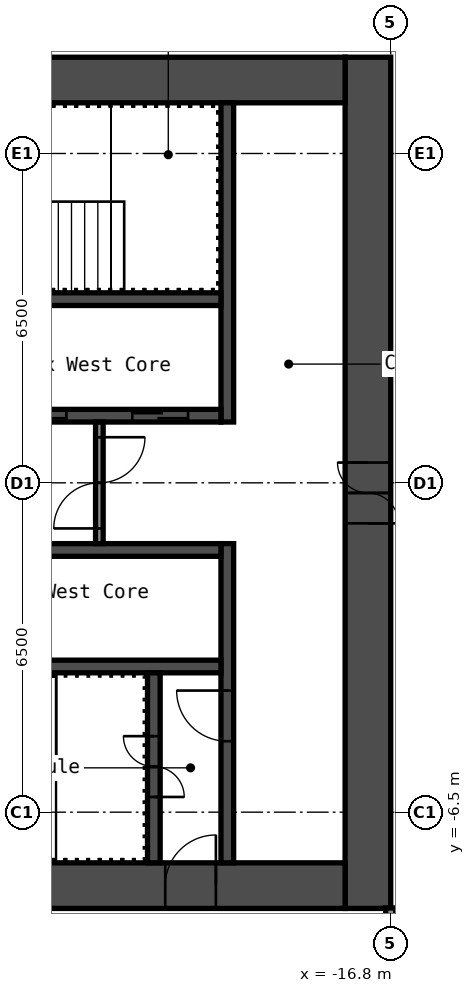
"""IFC4 building model, lengths in metres.
Left out: names, types, materials, properties, quantities, classifications, styles, units other than length and angle.
Written with IfcOpenShell. Run it as: python <this file> out.ifc"""

import sys

from ifc_helpers import new_model, si_unit, direction, frame, frame_2d, origin, place, context, subcontext, project, spatial, rectangle, extrude, element, fill, save


model = new_model("IFC4")
c1 = context("Model", 3, precision=1e-05, world=origin(), true_north=direction((0.0, 1.0)))
c2 = subcontext(c1, "Body", "Model", "MODEL_VIEW")
j1 = project(units=[si_unit("LENGTHUNIT", "METRE"), si_unit("PLANEANGLEUNIT", "RADIAN")], contexts=[c1])
p1 = place(None, origin())
s1 = spatial("IfcSite", under=j1, at=p1, CompositionType="ELEMENT")
p2 = place(p1, origin())
s2 = spatial("IfcBuilding", under=s1, at=p2, CompositionType="ELEMENT")
p3 = place(p2, frame((0.0, 0.0, 69.0)))
s3 = spatial("IfcBuildingStorey", under=s2, at=p3, CompositionType="ELEMENT", Elevation=69.0)
p4 = place(p3, frame((-17.25, -8.4, 0.0), z_axis=(0.0, 0.0, 1.0), x_axis=(0.0, 1.0, 0.0)))
e1 = element("IfcWall", 1, at=p4, inside=s3, PredefinedType="SHEAR", context=c2, shape_type="SweptSolid", body=[
    extrude(rectangle(XDim=16.8, YDim=0.9, at=frame_2d((8.4, 0.0))), origin(), (0.0, 0.0, 1.0), 6.0),
])
p5 = place(p4, frame((7.6, 0.0, 0.0)))
e2 = element("IfcOpeningElement", 2, at=p5, cuts=e1, PredefinedType="OPENING", context=c2, shape_type="SweptSolid", body=[
    extrude(rectangle(XDim=1.2, YDim=2.1, at=frame_2d((0.6, 1.05))), frame((0.0, 0.46, 0.0), z_axis=(0.0, -1.0, 0.0), x_axis=(1.0, 0.0, 0.0)), (0.0, 0.0, 1.0), 0.92),
])
p6 = place(p3, frame((-32.7, 7.95, 0.0), z_axis=(0.0, 0.0, 1.0), x_axis=(1.0, 0.0, 0.0)))
e3 = element("IfcWall", 3, at=p6, inside=s3, PredefinedType="SHEAR", context=c2, shape_type="SweptSolid", body=[
    extrude(rectangle(XDim=15.0, YDim=0.9, at=frame_2d((7.5, 0.0))), origin(), (0.0, 0.0, 1.0), 6.0),
])
p7 = place(p6, frame((3.4, 0.0, 0.0)))
e4 = element("IfcOpeningElement", 4, at=p7, cuts=e3, PredefinedType="OPENING", context=c2, shape_type="SweptSolid", body=[
    extrude(rectangle(XDim=1.2, YDim=2.1, at=frame_2d((0.6, 1.05))), frame((0.0, 0.46, 0.0), z_axis=(0.0, -1.0, 0.0), x_axis=(1.0, 0.0, 0.0)), (0.0, 0.0, 1.0), 0.92),
])
p8 = place(p6, frame((0.75, 0.0, 0.0)))
e5 = element("IfcOpeningElement", 5, at=p8, cuts=e3, PredefinedType="OPENING", context=c2, shape_type="SweptSolid", body=[
    extrude(rectangle(XDim=0.9, YDim=2.1, at=frame_2d((0.45, 1.05))), frame((0.0, 0.46, 0.0), z_axis=(0.0, -1.0, 0.0), x_axis=(1.0, 0.0, 0.0)), (0.0, 0.0, 1.0), 0.92),
])
p9 = place(p3, frame((-32.7, -7.95, 0.0), z_axis=(0.0, 0.0, 1.0), x_axis=(1.0, 0.0, 0.0)))
e6 = element("IfcWall", 6, at=p9, inside=s3, PredefinedType="SHEAR", context=c2, shape_type="SweptSolid", body=[
    extrude(rectangle(XDim=15.0, YDim=0.9, at=frame_2d((7.5, 0.0))), origin(), (0.0, 0.0, 1.0), 6.0),
])
p10 = place(p9, frame((11.45, 0.0, 0.0)))
e7 = element("IfcOpeningElement", 7, at=p10, cuts=e6, PredefinedType="OPENING", context=c2, shape_type="SweptSolid", body=[
    extrude(rectangle(XDim=1.0, YDim=2.1, at=frame_2d((0.5, 1.05))), frame((0.0, 0.46, 0.0), z_axis=(0.0, -1.0, 0.0), x_axis=(1.0, 0.0, 0.0)), (0.0, 0.0, 1.0), 0.92),
])
p11 = place(p3, frame((-20.025, 1.2, 0.0), z_axis=(0.0, 0.0, 1.0), x_axis=(0.0, 1.0, 0.0)))
e8 = element("IfcWall", 8, at=p11, inside=s3, PredefinedType="SHEAR", context=c2, shape_type="SweptSolid", body=[
    extrude(rectangle(XDim=6.3, YDim=0.25, at=frame_2d((3.15, 0.0))), origin(), (0.0, 0.0, 1.0), 6.0),
])
p12 = place(p3, frame((-20.025, -7.5, 0.0), z_axis=(0.0, 0.0, 1.0), x_axis=(0.0, 1.0, 0.0)))
e9 = element("IfcWall", 9, at=p12, inside=s3, PredefinedType="SHEAR", context=c2, shape_type="SweptSolid", body=[
    extrude(rectangle(XDim=6.3, YDim=0.25, at=frame_2d((3.15, 0.0))), origin(), (0.0, 0.0, 1.0), 6.0),
])
p13 = place(p12, frame((2.4, 0.0, 0.0)))
e10 = element("IfcOpeningElement", 10, at=p13, cuts=e9, PredefinedType="OPENING", context=c2, shape_type="SweptSolid", body=[
    extrude(rectangle(XDim=1.0, YDim=2.1, at=frame_2d((0.5, 1.05))), frame((0.0, 0.135, 0.0), z_axis=(0.0, -1.0, 0.0), x_axis=(1.0, 0.0, 0.0)), (0.0, 0.0, 1.0), 0.27),
])
p14 = place(p3, frame((-27.65, 1.325, 0.0), z_axis=(0.0, 0.0, 1.0), x_axis=(1.0, 0.0, 0.0)))
e11 = element("IfcWall", 11, at=p14, inside=s3, PredefinedType="SHEAR", context=c2, shape_type="SweptSolid", body=[
    extrude(rectangle(XDim=7.5, YDim=0.25, at=frame_2d((3.75, 0.0))), origin(), (0.0, 0.0, 1.0), 6.0),
])
p15 = place(p14, frame((5.75, 0.0, 0.0)))
e12 = element("IfcOpeningElement", 12, at=p15, cuts=e11, PredefinedType="OPENING", context=c2, shape_type="SweptSolid", body=[
    extrude(rectangle(XDim=1.1, YDim=2.1, at=frame_2d((0.55, 1.05))), frame((0.0, 0.135, 0.0), z_axis=(0.0, -1.0, 0.0), x_axis=(1.0, 0.0, 0.0)), (0.0, 0.0, 1.0), 0.27),
])
p16 = place(p14, frame((3.35, 0.0, 0.0)))
e13 = element("IfcOpeningElement", 13, at=p16, cuts=e11, PredefinedType="OPENING", context=c2, shape_type="SweptSolid", body=[
    extrude(rectangle(XDim=1.1, YDim=2.1, at=frame_2d((0.55, 1.05))), frame((0.0, 0.135, 0.0), z_axis=(0.0, -1.0, 0.0), x_axis=(1.0, 0.0, 0.0)), (0.0, 0.0, 1.0), 0.27),
])
p17 = place(p14, frame((0.95, 0.0, 0.0)))
e14 = element("IfcOpeningElement", 14, at=p17, cuts=e11, PredefinedType="OPENING", context=c2, shape_type="SweptSolid", body=[
    extrude(rectangle(XDim=1.1, YDim=2.1, at=frame_2d((0.55, 1.05))), frame((0.0, 0.135, 0.0), z_axis=(0.0, -1.0, 0.0), x_axis=(1.0, 0.0, 0.0)), (0.0, 0.0, 1.0), 0.27),
])
for number, where, z_axis, x_axis in (
    (15, (-27.65, 3.625, 0.0), (0.0, 0.0, 1.0), (1.0, 0.0, 0.0)),
    (16, (-27.65, -1.325, 0.0), (0.0, 0.0, 1.0), (1.0, 0.0, 0.0)),
    (17, (-27.65, -3.625, 0.0), (0.0, 0.0, 1.0), (1.0, 0.0, 0.0)),
):
    element("IfcWall", number, at=place(p3, frame(where, z_axis=z_axis, x_axis=x_axis)), inside=s3, PredefinedType="SHEAR", context=c2, shape_type="SweptSolid", body=[
        extrude(rectangle(XDim=7.5, YDim=0.25, at=frame_2d((3.75, 0.0))), origin(), (0.0, 0.0, 1.0), 6.0),
    ])
p18 = place(p3, frame((-21.475, -7.5, 0.0), z_axis=(0.0, 0.0, 1.0), x_axis=(0.0, 1.0, 0.0)))
e18 = element("IfcWall", 18, at=p18, inside=s3, PredefinedType="SHEAR", context=c2, shape_type="SweptSolid", body=[
    extrude(rectangle(XDim=3.75, YDim=0.25, at=frame_2d((1.875, 0.0))), origin(), (0.0, 0.0, 1.0), 6.0),
])
p19 = place(p18, frame((1.3, 0.0, 0.0)))
e19 = element("IfcOpeningElement", 19, at=p19, cuts=e18, PredefinedType="OPENING", context=c2, shape_type="SweptSolid", body=[
    extrude(rectangle(XDim=1.2, YDim=2.1, at=frame_2d((0.6, 1.05))), frame((0.0, 0.135, 0.0), z_axis=(0.0, -1.0, 0.0), x_axis=(1.0, 0.0, 0.0)), (0.0, 0.0, 1.0), 0.27),
])
p20 = place(p3, frame((-22.55, -1.2, 0.0), z_axis=(0.0, 0.0, 1.0), x_axis=(0.0, 1.0, 0.0)))
e20 = element("IfcWall", 20, at=p20, inside=s3, PredefinedType="PARTITIONING", context=c2, shape_type="SweptSolid", body=[
    extrude(rectangle(XDim=2.4, YDim=0.15, at=frame_2d((1.2, 0.0))), origin(), (0.0, 0.0, 1.0), 6.0),
])
p21 = place(p20, frame((0.3, 0.0, 0.0)))
e21 = element("IfcOpeningElement", 21, at=p21, cuts=e20, PredefinedType="OPENING", context=c2, shape_type="SweptSolid", body=[
    extrude(rectangle(XDim=1.8, YDim=2.1, at=frame_2d((0.9, 1.05))), frame((0.0, 0.085, 0.0), z_axis=(0.0, -1.0, 0.0), x_axis=(1.0, 0.0, 0.0)), (0.0, 0.0, 1.0), 0.17),
])
p22 = place(p3, frame((-16.8, -15.55, 0.0), z_axis=(0.0, 0.0, 1.0), x_axis=(0.0, 1.0, 0.0)))
e22 = element("IfcWall", 22, at=p22, inside=s3, PredefinedType="PARTITIONING", context=c2, shape_type="SweptSolid", body=[
    extrude(rectangle(XDim=7.16, YDim=0.2, at=frame_2d((3.58, 0.0))), origin(), (0.0, 0.0, 1.0), 6.0),
])
p23 = place(p5, origin())
e23 = element("IfcDoor", 23, at=p23, inside=s3, OperationType="DOUBLE_DOOR_SINGLE_SWING", PredefinedType="DOOR", context=c2, shape_type="SweptSolid", body=[
    extrude(rectangle(XDim=1.2, YDim=2.1, at=frame_2d((0.6, 1.05))), frame((0.0, 0.025, 0.0), z_axis=(0.0, -1.0, 0.0), x_axis=(1.0, 0.0, 0.0)), (0.0, 0.0, 1.0), 0.05),
])
fill(e2, e23)
p24 = place(p10, origin())
e24 = element("IfcDoor", 24, at=p24, inside=s3, OperationType="SINGLE_SWING_LEFT", PredefinedType="DOOR", context=c2, shape_type="SweptSolid", body=[
    extrude(rectangle(XDim=1.0, YDim=2.1, at=frame_2d((0.5, 1.05))), frame((0.0, 0.025, 0.0), z_axis=(0.0, -1.0, 0.0), x_axis=(1.0, 0.0, 0.0)), (0.0, 0.0, 1.0), 0.05),
])
fill(e7, e24)
p25 = place(p19, origin())
e25 = element("IfcDoor", 25, at=p25, inside=s3, OperationType="DOUBLE_DOOR_SINGLE_SWING", PredefinedType="DOOR", context=c2, shape_type="SweptSolid", body=[
    extrude(rectangle(XDim=1.2, YDim=2.1, at=frame_2d((0.6, 1.05))), frame((0.0, 0.025, 0.0), z_axis=(0.0, -1.0, 0.0), x_axis=(1.0, 0.0, 0.0)), (0.0, 0.0, 1.0), 0.05),
])
fill(e19, e25)
p26 = place(p13, origin())
e26 = element("IfcDoor", 26, at=p26, inside=s3, OperationType="SINGLE_SWING_LEFT", PredefinedType="DOOR", context=c2, shape_type="SweptSolid", body=[
    extrude(rectangle(XDim=1.0, YDim=2.1, at=frame_2d((0.5, 1.05))), frame((0.0, 0.025, 0.0), z_axis=(0.0, -1.0, 0.0), x_axis=(1.0, 0.0, 0.0)), (0.0, 0.0, 1.0), 0.05),
])
fill(e10, e26)
p27 = place(p21, origin())
e27 = element("IfcDoor", 27, at=p27, inside=s3, OperationType="DOUBLE_DOOR_SINGLE_SWING", PredefinedType="DOOR", context=c2, shape_type="SweptSolid", body=[
    extrude(rectangle(XDim=1.8, YDim=2.1, at=frame_2d((0.9, 1.05))), frame((0.0, 0.025, 0.0), z_axis=(0.0, -1.0, 0.0), x_axis=(1.0, 0.0, 0.0)), (0.0, 0.0, 1.0), 0.05),
])
fill(e21, e27)
p28 = place(p15, origin())
e28 = element("IfcDoor", 28, at=p28, inside=s3, OperationType="DOUBLE_DOOR_SLIDING", PredefinedType="DOOR", context=c2, shape_type="SweptSolid", body=[
    extrude(rectangle(XDim=1.1, YDim=2.1, at=frame_2d((0.55, 1.05))), frame((0.0, 0.025, 0.0), z_axis=(0.0, -1.0, 0.0), x_axis=(1.0, 0.0, 0.0)), (0.0, 0.0, 1.0), 0.05),
])
fill(e12, e28)
p29 = place(p16, origin())
e29 = element("IfcDoor", 29, at=p29, inside=s3, OperationType="DOUBLE_DOOR_SLIDING", PredefinedType="DOOR", context=c2, shape_type="SweptSolid", body=[
    extrude(rectangle(XDim=1.1, YDim=2.1, at=frame_2d((0.55, 1.05))), frame((0.0, 0.025, 0.0), z_axis=(0.0, -1.0, 0.0), x_axis=(1.0, 0.0, 0.0)), (0.0, 0.0, 1.0), 0.05),
])
fill(e13, e29)
save(model, sys.argv[1])
